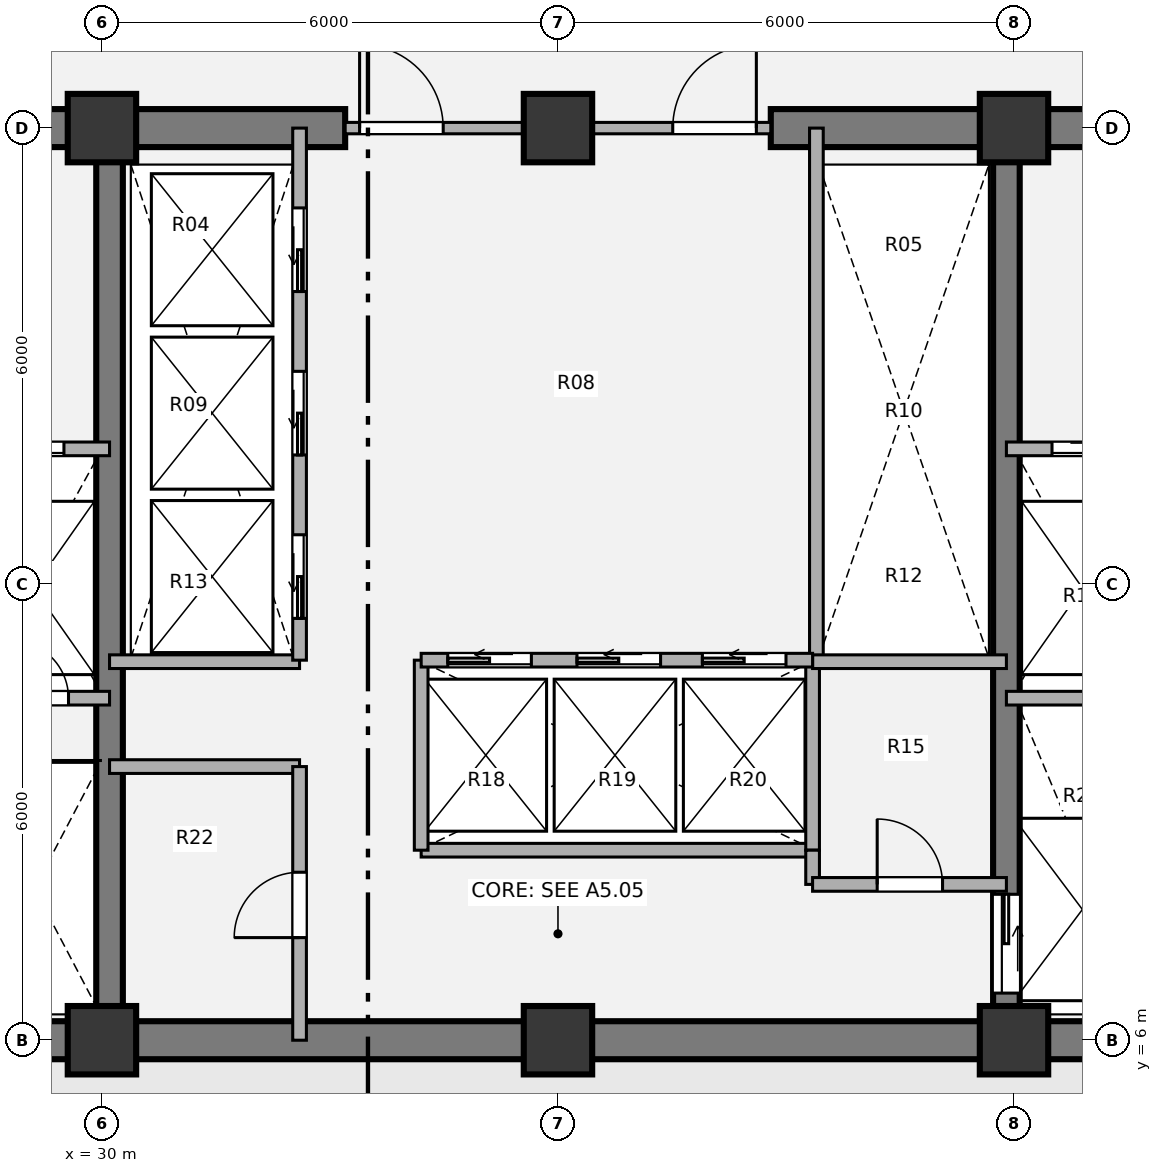
"""IFC4 building model, lengths in metres.
Left out: names, types, materials, properties, quantities, classifications, styles, units other than length and angle.
Written with IfcOpenShell. Run it as: python <this file> out.ifc"""

import sys

from ifc_helpers import new_model, si_unit, direction, frame, frame_2d, origin, origin_2d, place, context, subcontext, project, spatial, rectangle, extrude, source, transform, mapped, element, fill, save


model = new_model("IFC4")
c1 = context("Model", 3, precision=1e-05, world=origin(), true_north=direction((0.0, 1.0)))
c2 = subcontext(c1, "Body", "Model", "MODEL_VIEW")
j1 = project(units=[si_unit("LENGTHUNIT", "METRE"), si_unit("PLANEANGLEUNIT", "RADIAN")], contexts=[c1])
p1 = place(None, origin())
s1 = spatial("IfcSite", under=j1, at=p1, CompositionType="ELEMENT")
p2 = place(p1, origin())
s2 = spatial("IfcBuilding", under=s1, at=p2, CompositionType="ELEMENT")
p3 = place(p2, frame((0.0, 0.0, 85.32)))
s3 = spatial("IfcBuildingStorey", under=s2, at=p3, CompositionType="ELEMENT", Elevation=85.32)
m1 = source(origin(), c2, "Body", "SweptSolid", [
    extrude(rectangle(XDim=0.9, YDim=0.9, at=origin_2d()), origin(), (0.0, 0.0, 1.0), 4.5),
])
for number, where, z_axis, x_axis in (
    (1, (30.0, 6.0, 0.0), (0.0, 0.0, 1.0), (1.0, 0.0, 0.0)),
    (2, (36.0, 6.0, 0.0), (0.0, 0.0, 1.0), (1.0, 0.0, 0.0)),
    (3, (42.0, 6.0, 0.0), (0.0, 0.0, 1.0), (1.0, 0.0, 0.0)),
    (4, (30.0, 18.0, 0.0), (0.0, 0.0, 1.0), (1.0, 0.0, 0.0)),
    (5, (36.0, 18.0, 0.0), (0.0, 0.0, 1.0), (1.0, 0.0, 0.0)),
    (6, (42.0, 18.0, 0.0), (0.0, 0.0, 1.0), (1.0, 0.0, 0.0)),
):
    element("IfcColumn", number, at=place(p3, frame(where, z_axis=z_axis, x_axis=x_axis)), inside=s3, PredefinedType="COLUMN", context=c2, shape_type="MappedRepresentation", body=[
        mapped(m1, transform((0.0, 0.0, 0.0), x_axis=(1.0, 0.0, 0.0), y_axis=(0.0, 1.0, 0.0), z_axis=(0.0, 0.0, 1.0), scale=1.0)),
    ])
p4 = place(p3, frame((48.25, 6.0, 0.0), z_axis=(0.0, 0.0, 1.0), x_axis=(-1.0, 0.0, 0.0)))
e7 = element("IfcWall", 7, at=p4, inside=s3, PredefinedType="SHEAR", context=c2, shape_type="SweptSolid", body=[
    extrude(rectangle(XDim=24.5, YDim=0.5, at=frame_2d((12.25, 0.0))), origin(), (0.0, 0.0, 1.0), 4.5),
])
p5 = place(p3, frame((23.75, 18.0, 0.0), z_axis=(0.0, 0.0, 1.0), x_axis=(1.0, 0.0, 0.0)))
e8 = element("IfcWall", 8, at=p5, inside=s3, PredefinedType="SHEAR", context=c2, shape_type="SweptSolid", body=[
    extrude(rectangle(XDim=9.45, YDim=0.5, at=frame_2d((4.725, 0.0))), origin(), (0.0, 0.0, 1.0), 4.5),
])
p6 = place(p5, frame((2.95, 0.0, 0.0)))
e9 = element("IfcOpeningElement", 9, at=p6, cuts=e8, PredefinedType="OPENING", context=c2, shape_type="SweptSolid", body=[
    extrude(rectangle(XDim=1.1, YDim=2.1, at=origin_2d()), frame((0.55, 0.26, 1.05), z_axis=(0.0, -1.0, 0.0), x_axis=(1.0, 0.0, 0.0)), (0.0, 0.0, 1.0), 0.52),
])
p7 = place(p3, frame((38.8, 18.0, 0.0), z_axis=(0.0, 0.0, 1.0), x_axis=(1.0, 0.0, 0.0)))
e10 = element("IfcWall", 10, at=p7, inside=s3, PredefinedType="SHEAR", context=c2, shape_type="SweptSolid", body=[
    extrude(rectangle(XDim=9.45, YDim=0.5, at=frame_2d((4.725, 0.0))), origin(), (0.0, 0.0, 1.0), 4.5),
])
p8 = place(p7, frame((5.45, 0.0, 0.0)))
e11 = element("IfcOpeningElement", 11, at=p8, cuts=e10, PredefinedType="OPENING", context=c2, shape_type="SweptSolid", body=[
    extrude(rectangle(XDim=1.1, YDim=2.1, at=origin_2d()), frame((0.55, 0.26, 1.05), z_axis=(0.0, -1.0, 0.0), x_axis=(1.0, 0.0, 0.0)), (0.0, 0.0, 1.0), 0.52),
])
p9 = place(p3, frame((30.1, 6.0, 0.0), z_axis=(0.0, 0.0, 1.0), x_axis=(0.0, 1.0, 0.0)))
e12 = element("IfcWall", 12, at=p9, inside=s3, PredefinedType="SHEAR", context=c2, shape_type="SweptSolid", body=[
    extrude(rectangle(XDim=12.0, YDim=0.35, at=frame_2d((6.0, 0.0))), origin(), (0.0, 0.0, 1.0), 4.5),
])
p10 = place(p3, frame((41.9, 18.0, 0.0), z_axis=(0.0, 0.0, 1.0), x_axis=(0.0, -1.0, 0.0)))
e13 = element("IfcWall", 13, at=p10, inside=s3, PredefinedType="SHEAR", context=c2, shape_type="SweptSolid", body=[
    extrude(rectangle(XDim=12.0, YDim=0.35, at=frame_2d((6.0, 0.0))), origin(), (0.0, 0.0, 1.0), 4.5),
])
p11 = place(p10, frame((10.08, 0.0, 0.0)))
e14 = element("IfcOpeningElement", 14, at=p11, cuts=e13, PredefinedType="OPENING", context=c2, shape_type="SweptSolid", body=[
    extrude(rectangle(XDim=1.3, YDim=2.1, at=origin_2d()), frame((0.65, 0.185, 1.05), z_axis=(0.0, -1.0, 0.0), x_axis=(1.0, 0.0, 0.0)), (0.0, 0.0, 1.0), 0.37),
])
p12 = place(p3, frame((34.2, 8.5, 0.0), z_axis=(0.0, 0.0, 1.0), x_axis=(1.0, 0.0, 0.0)))
e15 = element("IfcWall", 15, at=p12, inside=s3, PredefinedType="PARTITIONING", context=c2, shape_type="SweptSolid", body=[
    extrude(rectangle(XDim=5.15, YDim=0.18, at=frame_2d((2.575, 0.0))), origin(), (0.0, 0.0, 1.0), 4.062),
])
for number, where, z_axis, x_axis in (
    (16, (34.2, 8.5, 0.0), (0.0, 0.0, 1.0), (0.0, 1.0, 0.0)),
    (17, (39.35, 8.5, 0.0), (0.0, 0.0, 1.0), (0.0, 1.0, 0.0)),
):
    element("IfcWall", number, at=place(p3, frame(where, z_axis=z_axis, x_axis=x_axis)), inside=s3, PredefinedType="PARTITIONING", context=c2, shape_type="SweptSolid", body=[
        extrude(rectangle(XDim=2.5, YDim=0.18, at=frame_2d((1.25, 0.0))), origin(), (0.0, 0.0, 1.0), 4.062),
    ])
p13 = place(p3, frame((39.4, 11.0, 0.0), z_axis=(0.0, 0.0, 1.0), x_axis=(0.0, 1.0, 0.0)))
e18 = element("IfcWall", 18, at=p13, inside=s3, PredefinedType="PARTITIONING", context=c2, shape_type="SweptSolid", body=[
    extrude(rectangle(XDim=7.0, YDim=0.18, at=frame_2d((3.5, 0.0))), origin(), (0.0, 0.0, 1.0), 4.062),
])
for number, where, z_axis, x_axis in (
    (19, (30.1, 10.98, 0.0), (0.0, 0.0, 1.0), (1.0, 0.0, 0.0)),
    (20, (30.1, 9.6, 0.0), (0.0, 0.0, 1.0), (1.0, 0.0, 0.0)),
):
    element("IfcWall", number, at=place(p3, frame(where, z_axis=z_axis, x_axis=x_axis)), inside=s3, PredefinedType="PARTITIONING", context=c2, shape_type="SweptSolid", body=[
        extrude(rectangle(XDim=2.5, YDim=0.18, at=frame_2d((1.25, 0.0))), origin(), (0.0, 0.0, 1.0), 4.062),
    ])
p14 = place(p3, frame((32.6, 6.0, 0.0), z_axis=(0.0, 0.0, 1.0), x_axis=(0.0, 1.0, 0.0)))
e21 = element("IfcWall", 21, at=p14, inside=s3, PredefinedType="PARTITIONING", context=c2, shape_type="SweptSolid", body=[
    extrude(rectangle(XDim=3.6, YDim=0.18, at=frame_2d((1.8, 0.0))), origin(), (0.0, 0.0, 1.0), 4.062),
])
p15 = place(p14, frame((1.35, 0.0, 0.0)))
e22 = element("IfcOpeningElement", 22, at=p15, cuts=e21, PredefinedType="OPENING", context=c2, shape_type="SweptSolid", body=[
    extrude(rectangle(XDim=0.86, YDim=2.1, at=origin_2d()), frame((0.43, 0.1, 1.05), z_axis=(0.0, -1.0, 0.0), x_axis=(1.0, 0.0, 0.0)), (0.0, 0.0, 1.0), 0.2),
])
p16 = place(p3, frame((39.35, 10.98, 0.0), z_axis=(0.0, 0.0, 1.0), x_axis=(1.0, 0.0, 0.0)))
e23 = element("IfcWall", 23, at=p16, inside=s3, PredefinedType="PARTITIONING", context=c2, shape_type="SweptSolid", body=[
    extrude(rectangle(XDim=2.55, YDim=0.18, at=frame_2d((1.275, 0.0))), origin(), (0.0, 0.0, 1.0), 4.062),
])
p17 = place(p3, frame((39.35, 8.05, 0.0), z_axis=(0.0, 0.0, 1.0), x_axis=(0.0, 1.0, 0.0)))
e24 = element("IfcWall", 24, at=p17, inside=s3, PredefinedType="PARTITIONING", context=c2, shape_type="SweptSolid", body=[
    extrude(rectangle(XDim=0.45, YDim=0.18, at=frame_2d((0.225, 0.0))), origin(), (0.0, 0.0, 1.0), 4.062),
])
p18 = place(p3, frame((39.35, 8.05, 0.0), z_axis=(0.0, 0.0, 1.0), x_axis=(1.0, 0.0, 0.0)))
e25 = element("IfcWall", 25, at=p18, inside=s3, PredefinedType="PARTITIONING", context=c2, shape_type="SweptSolid", body=[
    extrude(rectangle(XDim=2.55, YDim=0.18, at=frame_2d((1.275, 0.0))), origin(), (0.0, 0.0, 1.0), 4.062),
])
p19 = place(p18, frame((0.85, 0.0, 0.0)))
e26 = element("IfcOpeningElement", 26, at=p19, cuts=e25, PredefinedType="OPENING", context=c2, shape_type="SweptSolid", body=[
    extrude(rectangle(XDim=0.86, YDim=2.1, at=origin_2d()), frame((0.43, 0.1, 1.05), z_axis=(0.0, -1.0, 0.0), x_axis=(1.0, 0.0, 0.0)), (0.0, 0.0, 1.0), 0.2),
])
p20 = place(p3, frame((33.2, 18.0, 0.0), z_axis=(0.0, 0.0, 1.0), x_axis=(1.0, 0.0, 0.0)))
e27 = element("IfcWall", 27, at=p20, inside=s3, PredefinedType="PARTITIONING", context=c2, shape_type="SweptSolid", body=[
    extrude(rectangle(XDim=5.6, YDim=0.15, at=frame_2d((2.8, 0.0))), origin(), (0.0, 0.0, 1.0), 2.877),
])
p21 = place(p20, frame((0.19, 0.0, 0.0)))
e28 = element("IfcOpeningElement", 28, at=p21, cuts=e27, PredefinedType="OPENING", context=c2, shape_type="SweptSolid", body=[
    extrude(rectangle(XDim=1.1, YDim=2.1, at=origin_2d()), frame((0.55, 0.085, 1.05), z_axis=(0.0, -1.0, 0.0), x_axis=(1.0, 0.0, 0.0)), (0.0, 0.0, 1.0), 0.17),
])
p22 = place(p20, frame((4.31, 0.0, 0.0)))
e29 = element("IfcOpeningElement", 29, at=p22, cuts=e27, PredefinedType="OPENING", context=c2, shape_type="SweptSolid", body=[
    extrude(rectangle(XDim=1.1, YDim=2.1, at=origin_2d()), frame((0.55, 0.085, 1.05), z_axis=(0.0, -1.0, 0.0), x_axis=(1.0, 0.0, 0.0)), (0.0, 0.0, 1.0), 0.17),
])
p23 = place(p3, frame((24.0, 13.78, 0.0), z_axis=(0.0, 0.0, 1.0), x_axis=(1.0, 0.0, 0.0)))
e30 = element("IfcWall", 30, at=p23, inside=s3, PredefinedType="PARTITIONING", context=c2, shape_type="SweptSolid", body=[
    extrude(rectangle(XDim=6.1, YDim=0.18, at=frame_2d((3.05, 0.0))), origin(), (0.0, 0.0, 1.0), 4.062),
])
p24 = place(p23, frame((1.15, 0.0, 0.0)))
e31 = element("IfcOpeningElement", 31, at=p24, cuts=e30, PredefinedType="OPENING", context=c2, shape_type="SweptSolid", body=[
    extrude(rectangle(XDim=1.1, YDim=2.1, at=origin_2d()), frame((0.55, 0.1, 1.05), z_axis=(0.0, -1.0, 0.0), x_axis=(1.0, 0.0, 0.0)), (0.0, 0.0, 1.0), 0.2),
])
p25 = place(p23, frame((4.4, 0.0, 0.0)))
e32 = element("IfcOpeningElement", 32, at=p25, cuts=e30, PredefinedType="OPENING", context=c2, shape_type="SweptSolid", body=[
    extrude(rectangle(XDim=1.1, YDim=2.1, at=origin_2d()), frame((0.55, 0.1, 1.05), z_axis=(0.0, -1.0, 0.0), x_axis=(1.0, 0.0, 0.0)), (0.0, 0.0, 1.0), 0.2),
])
p26 = place(p3, frame((28.15, 10.5, 0.0), z_axis=(0.0, 0.0, 1.0), x_axis=(1.0, 0.0, 0.0)))
e33 = element("IfcWall", 33, at=p26, inside=s3, PredefinedType="PARTITIONING", context=c2, shape_type="SweptSolid", body=[
    extrude(rectangle(XDim=1.95, YDim=0.18, at=frame_2d((0.975, 0.0))), origin(), (0.0, 0.0, 1.0), 4.062),
])
p27 = place(p26, frame((0.65, 0.0, 0.0)))
e34 = element("IfcOpeningElement", 34, at=p27, cuts=e33, PredefinedType="OPENING", context=c2, shape_type="SweptSolid", body=[
    extrude(rectangle(XDim=0.76, YDim=2.05, at=origin_2d()), frame((0.38, 0.1, 1.025), z_axis=(0.0, -1.0, 0.0), x_axis=(1.0, 0.0, 0.0)), (0.0, 0.0, 1.0), 0.2),
])
p28 = place(p3, frame((41.9, 13.78, 0.0), z_axis=(0.0, 0.0, 1.0), x_axis=(1.0, 0.0, 0.0)))
e35 = element("IfcWall", 35, at=p28, inside=s3, PredefinedType="PARTITIONING", context=c2, shape_type="SweptSolid", body=[
    extrude(rectangle(XDim=6.1, YDim=0.18, at=frame_2d((3.05, 0.0))), origin(), (0.0, 0.0, 1.0), 4.062),
])
p29 = place(p28, frame((0.6, 0.0, 0.0)))
e36 = element("IfcOpeningElement", 36, at=p29, cuts=e35, PredefinedType="OPENING", context=c2, shape_type="SweptSolid", body=[
    extrude(rectangle(XDim=1.1, YDim=2.1, at=origin_2d()), frame((0.55, 0.1, 1.05), z_axis=(0.0, -1.0, 0.0), x_axis=(1.0, 0.0, 0.0)), (0.0, 0.0, 1.0), 0.2),
])
p30 = place(p28, frame((3.8, 0.0, 0.0)))
e37 = element("IfcOpeningElement", 37, at=p30, cuts=e35, PredefinedType="OPENING", context=c2, shape_type="SweptSolid", body=[
    extrude(rectangle(XDim=1.1, YDim=2.1, at=origin_2d()), frame((0.55, 0.1, 1.05), z_axis=(0.0, -1.0, 0.0), x_axis=(1.0, 0.0, 0.0)), (0.0, 0.0, 1.0), 0.2),
])
p31 = place(p3, frame((41.9, 10.5, 0.0), z_axis=(0.0, 0.0, 1.0), x_axis=(1.0, 0.0, 0.0)))
e38 = element("IfcWall", 38, at=p31, inside=s3, PredefinedType="PARTITIONING", context=c2, shape_type="SweptSolid", body=[
    extrude(rectangle(XDim=1.95, YDim=0.18, at=frame_2d((0.975, 0.0))), origin(), (0.0, 0.0, 1.0), 4.062),
])
p32 = place(p3, frame((32.6, 11.0, 0.0), z_axis=(0.0, 0.0, 1.0), x_axis=(0.0, 1.0, 0.0)))
e39 = element("IfcWall", 39, at=p32, inside=s3, PredefinedType="PARTITIONING", context=c2, shape_type="SweptSolid", body=[
    extrude(rectangle(XDim=7.0, YDim=0.18, at=frame_2d((3.5, 0.0))), origin(), (0.0, 0.0, 1.0), 4.062),
])
p33 = place(p32, frame((0.55, 0.0, 0.0)))
e40 = element("IfcOpeningElement", 40, at=p33, cuts=e39, PredefinedType="OPENING", context=c2, shape_type="SweptSolid", body=[
    extrude(rectangle(XDim=1.1, YDim=2.1, at=origin_2d()), frame((0.55, 0.1, 1.05), z_axis=(0.0, -1.0, 0.0), x_axis=(1.0, 0.0, 0.0)), (0.0, 0.0, 1.0), 0.2),
])
p34 = place(p32, frame((2.7, 0.0, 0.0)))
e41 = element("IfcOpeningElement", 41, at=p34, cuts=e39, PredefinedType="OPENING", context=c2, shape_type="SweptSolid", body=[
    extrude(rectangle(XDim=1.1, YDim=2.1, at=origin_2d()), frame((0.55, 0.1, 1.05), z_axis=(0.0, -1.0, 0.0), x_axis=(1.0, 0.0, 0.0)), (0.0, 0.0, 1.0), 0.2),
])
p35 = place(p32, frame((4.85, 0.0, 0.0)))
e42 = element("IfcOpeningElement", 42, at=p35, cuts=e39, PredefinedType="OPENING", context=c2, shape_type="SweptSolid", body=[
    extrude(rectangle(XDim=1.1, YDim=2.1, at=origin_2d()), frame((0.55, 0.1, 1.05), z_axis=(0.0, -1.0, 0.0), x_axis=(1.0, 0.0, 0.0)), (0.0, 0.0, 1.0), 0.2),
])
p36 = place(p3, frame((34.2, 11.0, 0.0), z_axis=(0.0, 0.0, 1.0), x_axis=(1.0, 0.0, 0.0)))
e43 = element("IfcWall", 43, at=p36, inside=s3, PredefinedType="PARTITIONING", context=c2, shape_type="SweptSolid", body=[
    extrude(rectangle(XDim=5.15, YDim=0.18, at=frame_2d((2.575, 0.0))), origin(), (0.0, 0.0, 1.0), 4.062),
])
p37 = place(p36, frame((0.35, 0.0, 0.0)))
e44 = element("IfcOpeningElement", 44, at=p37, cuts=e43, PredefinedType="OPENING", context=c2, shape_type="SweptSolid", body=[
    extrude(rectangle(XDim=1.1, YDim=2.1, at=origin_2d()), frame((0.55, 0.1, 1.05), z_axis=(0.0, -1.0, 0.0), x_axis=(1.0, 0.0, 0.0)), (0.0, 0.0, 1.0), 0.2),
])
p38 = place(p36, frame((2.05, 0.0, 0.0)))
e45 = element("IfcOpeningElement", 45, at=p38, cuts=e43, PredefinedType="OPENING", context=c2, shape_type="SweptSolid", body=[
    extrude(rectangle(XDim=1.1, YDim=2.1, at=origin_2d()), frame((0.55, 0.1, 1.05), z_axis=(0.0, -1.0, 0.0), x_axis=(1.0, 0.0, 0.0)), (0.0, 0.0, 1.0), 0.2),
])
p39 = place(p36, frame((3.7, 0.0, 0.0)))
e46 = element("IfcOpeningElement", 46, at=p39, cuts=e43, PredefinedType="OPENING", context=c2, shape_type="SweptSolid", body=[
    extrude(rectangle(XDim=1.1, YDim=2.1, at=origin_2d()), frame((0.55, 0.1, 1.05), z_axis=(0.0, -1.0, 0.0), x_axis=(1.0, 0.0, 0.0)), (0.0, 0.0, 1.0), 0.2),
])
m2 = source(origin(), c2, "Body", "SweptSolid", [
    extrude(rectangle(XDim=0.86, YDim=2.1, at=origin_2d()), frame((0.43, 0.025, 1.05), z_axis=(0.0, -1.0, 0.0), x_axis=(1.0, 0.0, 0.0)), (0.0, 0.0, 1.0), 0.05),
])
p40 = place(p15, origin())
e47 = element("IfcDoor", 47, at=p40, inside=s3, OperationType="SINGLE_SWING_LEFT", PredefinedType="DOOR", context=c2, shape_type="MappedRepresentation", body=[
    mapped(m2, transform((0.0, 0.0, 0.0), x_axis=(1.0, 0.0, 0.0), y_axis=(0.0, 1.0, 0.0), z_axis=(0.0, 0.0, 1.0), scale=1.0)),
])
fill(e22, e47)
p41 = place(p19, origin())
e48 = element("IfcDoor", 48, at=p41, inside=s3, OperationType="SINGLE_SWING_LEFT", PredefinedType="DOOR", context=c2, shape_type="MappedRepresentation", body=[
    mapped(m2, transform((0.0, 0.0, 0.0), x_axis=(1.0, 0.0, 0.0), y_axis=(0.0, 1.0, 0.0), z_axis=(0.0, 0.0, 1.0), scale=1.0)),
])
fill(e26, e48)
m3 = source(origin(), c2, "Body", "SweptSolid", [
    extrude(rectangle(XDim=1.1, YDim=2.1, at=origin_2d()), frame((0.55, 0.025, 1.05), z_axis=(0.0, -1.0, 0.0), x_axis=(1.0, 0.0, 0.0)), (0.0, 0.0, 1.0), 0.05),
])
p42 = place(p21, origin())
e49 = element("IfcDoor", 49, at=p42, inside=s3, OperationType="SINGLE_SWING_LEFT", PredefinedType="DOOR", context=c2, shape_type="MappedRepresentation", body=[
    mapped(m3, transform((0.0, 0.0, 0.0), x_axis=(1.0, 0.0, 0.0), y_axis=(0.0, 1.0, 0.0), z_axis=(0.0, 0.0, 1.0), scale=1.0)),
])
fill(e28, e49)
p43 = place(p22, origin())
e50 = element("IfcDoor", 50, at=p43, inside=s3, OperationType="SINGLE_SWING_RIGHT", PredefinedType="DOOR", context=c2, shape_type="MappedRepresentation", body=[
    mapped(m3, transform((0.0, 0.0, 0.0), x_axis=(1.0, 0.0, 0.0), y_axis=(0.0, 1.0, 0.0), z_axis=(0.0, 0.0, 1.0), scale=1.0)),
])
fill(e29, e50)
m4 = source(origin(), c2, "Body", "SweptSolid", [
    extrude(rectangle(XDim=1.1, YDim=2.1, at=origin_2d()), frame((0.55, 0.025, 1.05), z_axis=(0.0, -1.0, 0.0), x_axis=(1.0, 0.0, 0.0)), (0.0, 0.0, 1.0), 0.05),
])
p44 = place(p25, origin())
e51 = element("IfcDoor", 51, at=p44, inside=s3, OperationType="SLIDING_TO_LEFT", PredefinedType="DOOR", context=c2, shape_type="MappedRepresentation", body=[
    mapped(m4, transform((0.0, 0.0, 0.0), x_axis=(1.0, 0.0, 0.0), y_axis=(0.0, 1.0, 0.0), z_axis=(0.0, 0.0, 1.0), scale=1.0)),
])
fill(e32, e51)
m5 = source(origin(), c2, "Body", "SweptSolid", [
    extrude(rectangle(XDim=0.76, YDim=2.05, at=origin_2d()), frame((0.38, 0.025, 1.025), z_axis=(0.0, -1.0, 0.0), x_axis=(1.0, 0.0, 0.0)), (0.0, 0.0, 1.0), 0.05),
])
p45 = place(p27, origin())
e52 = element("IfcDoor", 52, at=p45, inside=s3, OperationType="SINGLE_SWING_LEFT", PredefinedType="DOOR", context=c2, shape_type="MappedRepresentation", body=[
    mapped(m5, transform((0.0, 0.0, 0.0), x_axis=(1.0, 0.0, 0.0), y_axis=(0.0, 1.0, 0.0), z_axis=(0.0, 0.0, 1.0), scale=1.0)),
])
fill(e34, e52)
p46 = place(p29, origin())
e53 = element("IfcDoor", 53, at=p46, inside=s3, OperationType="SLIDING_TO_RIGHT", PredefinedType="DOOR", context=c2, shape_type="MappedRepresentation", body=[
    mapped(m4, transform((0.0, 0.0, 0.0), x_axis=(1.0, 0.0, 0.0), y_axis=(0.0, 1.0, 0.0), z_axis=(0.0, 0.0, 1.0), scale=1.0)),
])
fill(e36, e53)
m6 = source(origin(), c2, "Body", "SweptSolid", [
    extrude(rectangle(XDim=1.3, YDim=2.1, at=origin_2d()), frame((0.65, 0.025, 1.05), z_axis=(0.0, -1.0, 0.0), x_axis=(1.0, 0.0, 0.0)), (0.0, 0.0, 1.0), 0.05),
])
p47 = place(p11, origin())
e54 = element("IfcDoor", 54, at=p47, inside=s3, OperationType="SLIDING_TO_LEFT", PredefinedType="DOOR", context=c2, shape_type="MappedRepresentation", body=[
    mapped(m6, transform((0.0, 0.0, 0.0), x_axis=(1.0, 0.0, 0.0), y_axis=(0.0, 1.0, 0.0), z_axis=(0.0, 0.0, 1.0), scale=1.0)),
])
fill(e14, e54)
p48 = place(p33, origin())
e55 = element("IfcDoor", 55, at=p48, inside=s3, OperationType="SLIDING_TO_LEFT", PredefinedType="DOOR", context=c2, shape_type="MappedRepresentation", body=[
    mapped(m4, transform((0.0, 0.0, 0.0), x_axis=(1.0, 0.0, 0.0), y_axis=(0.0, 1.0, 0.0), z_axis=(0.0, 0.0, 1.0), scale=1.0)),
])
fill(e40, e55)
p49 = place(p34, origin())
e56 = element("IfcDoor", 56, at=p49, inside=s3, OperationType="SLIDING_TO_LEFT", PredefinedType="DOOR", context=c2, shape_type="MappedRepresentation", body=[
    mapped(m4, transform((0.0, 0.0, 0.0), x_axis=(1.0, 0.0, 0.0), y_axis=(0.0, 1.0, 0.0), z_axis=(0.0, 0.0, 1.0), scale=1.0)),
])
fill(e41, e56)
p50 = place(p35, origin())
e57 = element("IfcDoor", 57, at=p50, inside=s3, OperationType="SLIDING_TO_LEFT", PredefinedType="DOOR", context=c2, shape_type="MappedRepresentation", body=[
    mapped(m4, transform((0.0, 0.0, 0.0), x_axis=(1.0, 0.0, 0.0), y_axis=(0.0, 1.0, 0.0), z_axis=(0.0, 0.0, 1.0), scale=1.0)),
])
fill(e42, e57)
p51 = place(p37, origin())
e58 = element("IfcDoor", 58, at=p51, inside=s3, OperationType="SLIDING_TO_LEFT", PredefinedType="DOOR", context=c2, shape_type="MappedRepresentation", body=[
    mapped(m4, transform((0.0, 0.0, 0.0), x_axis=(1.0, 0.0, 0.0), y_axis=(0.0, 1.0, 0.0), z_axis=(0.0, 0.0, 1.0), scale=1.0)),
])
fill(e44, e58)
p52 = place(p38, origin())
e59 = element("IfcDoor", 59, at=p52, inside=s3, OperationType="SLIDING_TO_LEFT", PredefinedType="DOOR", context=c2, shape_type="MappedRepresentation", body=[
    mapped(m4, transform((0.0, 0.0, 0.0), x_axis=(1.0, 0.0, 0.0), y_axis=(0.0, 1.0, 0.0), z_axis=(0.0, 0.0, 1.0), scale=1.0)),
])
fill(e45, e59)
p53 = place(p39, origin())
e60 = element("IfcDoor", 60, at=p53, inside=s3, OperationType="SLIDING_TO_LEFT", PredefinedType="DOOR", context=c2, shape_type="MappedRepresentation", body=[
    mapped(m4, transform((0.0, 0.0, 0.0), x_axis=(1.0, 0.0, 0.0), y_axis=(0.0, 1.0, 0.0), z_axis=(0.0, 0.0, 1.0), scale=1.0)),
])
fill(e46, e60)
save(model, sys.argv[1])
